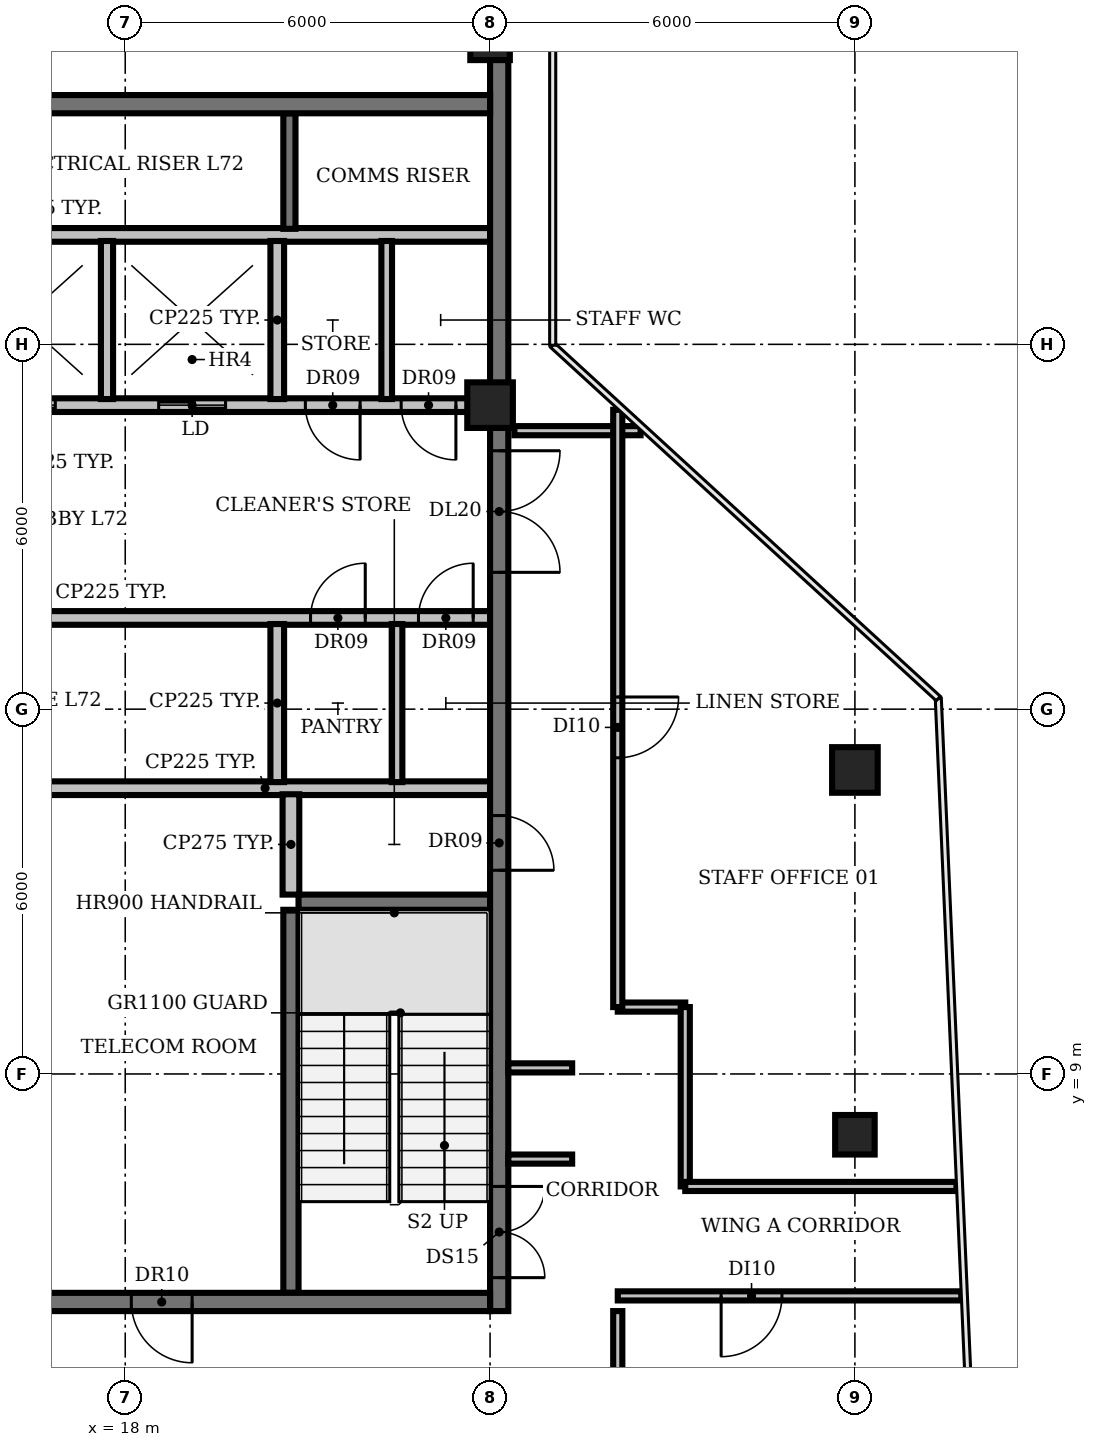
"""IFC4 building model, lengths in metres.
Left out: names, types, materials, properties, quantities, classifications, styles, units other than length and angle.
Written with IfcOpenShell. Run it as: python <this file> out.ifc"""

import sys

from ifc_helpers import new_model, si_unit, direction, frame, frame_2d, origin, origin_2d, place, context, subcontext, project, spatial, rectangle, circle, extrude, element, fill, save


model = new_model("IFC4")
c1 = context("Model", 3, precision=1e-05, world=origin(), true_north=direction((0.0, 1.0)))
c2 = subcontext(c1, "Body", "Model", "MODEL_VIEW")
j1 = project(units=[si_unit("LENGTHUNIT", "METRE"), si_unit("PLANEANGLEUNIT", "RADIAN")], contexts=[c1])
p1 = place(None, origin())
s1 = spatial("IfcSite", under=j1, at=p1, CompositionType="ELEMENT")
p2 = place(p1, origin())
s2 = spatial("IfcBuilding", under=s1, at=p2, CompositionType="ELEMENT")
p3 = place(p2, frame((0.0, 0.0, 323.0)))
s3 = spatial("IfcBuildingStorey", under=s2, at=p3, CompositionType="ELEMENT", Elevation=323.0)
p4 = place(p3, frame((24.0, 20.0, 0.0), z_axis=(0.0, 0.0, 1.0), x_axis=(1.0, 0.0, 0.0)))
e1 = element("IfcColumn", 1, at=p4, inside=s3, PredefinedType="COLUMN", context=c2, shape_type="SweptSolid", body=[
    extrude(circle(Radius=0.375, at=origin_2d()), origin(), (0.0, 0.0, 1.0), 3.9),
])
for number, where, z_axis, x_axis in (
    (2, (24.0, 26.0, 0.0), (0.0, 0.0, 1.0), (1.0, 0.0, 0.0)),
    (3, (30.0, 8.0, 0.0), (0.0, 0.0, 1.0), (1.0, 0.0, 0.0)),
):
    element("IfcColumn", number, at=place(p3, frame(where, z_axis=z_axis, x_axis=x_axis)), inside=s3, PredefinedType="COLUMN", context=c2, shape_type="SweptSolid", body=[
        extrude(rectangle(XDim=0.65, YDim=0.65, at=origin_2d()), origin(), (0.0, 0.0, 1.0), 3.9),
    ])
p5 = place(p3, frame((30.0, 14.0, 0.0), z_axis=(0.0, 0.0, 1.0), x_axis=(1.0, 0.0, 0.0)))
e4 = element("IfcColumn", 4, at=p5, inside=s3, PredefinedType="COLUMN", context=c2, shape_type="SweptSolid", body=[
    extrude(circle(Radius=0.375, at=origin_2d()), origin(), (0.0, 0.0, 1.0), 3.9),
])
p6 = place(p3, frame((20.85, 11.825, 0.0), z_axis=(0.0, 0.0, 1.0), x_axis=(1.0, 0.0, 0.0)))
e5 = element("IfcWall", 5, at=p6, inside=s3, PredefinedType="SHEAR", context=c2, shape_type="SweptSolid", body=[
    extrude(rectangle(XDim=3.15, YDim=0.25, at=frame_2d((1.575, 0.0))), origin(), (0.0, 0.0, 1.0), 3.9),
])
p7 = place(p3, frame((16.6, 13.7, 0.0), z_axis=(0.0, 0.0, 1.0), x_axis=(1.0, 0.0, 0.0)))
e6 = element("IfcWall", 6, at=p7, inside=s3, PredefinedType="PARTITIONING", context=c2, shape_type="SweptSolid", body=[
    extrude(rectangle(XDim=7.4, YDim=0.225, at=frame_2d((3.7, 0.0))), origin(), (0.0, 0.0, 1.0), 3.9),
])
p8 = place(p3, frame((9.4, 16.5, 0.0), z_axis=(0.0, 0.0, 1.0), x_axis=(1.0, 0.0, 0.0)))
e7 = element("IfcWall", 7, at=p8, inside=s3, PredefinedType="PARTITIONING", context=c2, shape_type="SweptSolid", body=[
    extrude(rectangle(XDim=14.6, YDim=0.225, at=frame_2d((7.3, 0.0))), origin(), (0.0, 0.0, 1.0), 3.9),
])
p9 = place(p8, frame((0.55, 0.0, 0.0)))
e8 = element("IfcOpeningElement", 8, at=p9, cuts=e7, PredefinedType="OPENING", context=c2, shape_type="SweptSolid", body=[
    extrude(rectangle(XDim=0.9, YDim=2.1, at=frame_2d((0.45, 1.05))), frame((0.0, 0.123, 0.0), z_axis=(0.0, -1.0, 0.0), x_axis=(1.0, 0.0, 0.0)), (0.0, 0.0, 1.0), 0.245),
])
p10 = place(p8, frame((6.075, 0.0, 0.0)))
e9 = element("IfcOpeningElement", 9, at=p10, cuts=e7, PredefinedType="OPENING", context=c2, shape_type="SweptSolid", body=[
    extrude(rectangle(XDim=1.0, YDim=2.1, at=frame_2d((0.5, 1.05))), frame((0.0, 0.123, 0.0), z_axis=(0.0, -1.0, 0.0), x_axis=(1.0, 0.0, 0.0)), (0.0, 0.0, 1.0), 0.245),
])
p11 = place(p8, frame((11.647, 0.0, 0.0)))
e10 = element("IfcOpeningElement", 10, at=p11, cuts=e7, PredefinedType="OPENING", context=c2, shape_type="SweptSolid", body=[
    extrude(rectangle(XDim=0.9, YDim=2.1, at=frame_2d((0.45, 1.05))), frame((0.0, 0.123, 0.0), z_axis=(0.0, -1.0, 0.0), x_axis=(1.0, 0.0, 0.0)), (0.0, 0.0, 1.0), 0.245),
])
p12 = place(p8, frame((13.423, 0.0, 0.0)))
e11 = element("IfcOpeningElement", 11, at=p12, cuts=e7, PredefinedType="OPENING", context=c2, shape_type="SweptSolid", body=[
    extrude(rectangle(XDim=0.9, YDim=2.1, at=frame_2d((0.45, 1.05))), frame((0.0, 0.123, 0.0), z_axis=(0.0, -1.0, 0.0), x_axis=(1.0, 0.0, 0.0)), (0.0, 0.0, 1.0), 0.245),
])
p13 = place(p3, frame((24.0, 20.0, 0.0), z_axis=(0.0, 0.0, 1.0), x_axis=(-1.0, 0.0, 0.0)))
e12 = element("IfcWall", 12, at=p13, inside=s3, PredefinedType="PARTITIONING", context=c2, shape_type="SweptSolid", body=[
    extrude(rectangle(XDim=14.6, YDim=0.225, at=frame_2d((7.3, 0.0))), origin(), (0.0, 0.0, 1.0), 3.9),
])
p14 = place(p13, frame((12.75, 0.0, 0.0)))
e13 = element("IfcOpeningElement", 13, at=p14, cuts=e12, PredefinedType="OPENING", context=c2, shape_type="SweptSolid", body=[
    extrude(rectangle(XDim=1.1, YDim=2.1, at=frame_2d((0.55, 1.05))), frame((0.0, 0.123, 0.0), z_axis=(0.0, -1.0, 0.0), x_axis=(1.0, 0.0, 0.0)), (0.0, 0.0, 1.0), 0.245),
])
p15 = place(p13, frame((9.95, 0.0, 0.0)))
e14 = element("IfcOpeningElement", 14, at=p15, cuts=e12, PredefinedType="OPENING", context=c2, shape_type="SweptSolid", body=[
    extrude(rectangle(XDim=1.1, YDim=2.1, at=frame_2d((0.55, 1.05))), frame((0.0, 0.123, 0.0), z_axis=(0.0, -1.0, 0.0), x_axis=(1.0, 0.0, 0.0)), (0.0, 0.0, 1.0), 0.245),
])
p16 = place(p13, frame((7.15, 0.0, 0.0)))
e15 = element("IfcOpeningElement", 15, at=p16, cuts=e12, PredefinedType="OPENING", context=c2, shape_type="SweptSolid", body=[
    extrude(rectangle(XDim=1.1, YDim=2.1, at=frame_2d((0.55, 1.05))), frame((0.0, 0.123, 0.0), z_axis=(0.0, -1.0, 0.0), x_axis=(1.0, 0.0, 0.0)), (0.0, 0.0, 1.0), 0.245),
])
p17 = place(p13, frame((4.35, 0.0, 0.0)))
e16 = element("IfcOpeningElement", 16, at=p17, cuts=e12, PredefinedType="OPENING", context=c2, shape_type="SweptSolid", body=[
    extrude(rectangle(XDim=1.1, YDim=2.1, at=frame_2d((0.55, 1.05))), frame((0.0, 0.123, 0.0), z_axis=(0.0, -1.0, 0.0), x_axis=(1.0, 0.0, 0.0)), (0.0, 0.0, 1.0), 0.245),
])
p18 = place(p13, frame((2.137, 0.0, 0.0)))
e17 = element("IfcOpeningElement", 17, at=p18, cuts=e12, PredefinedType="OPENING", context=c2, shape_type="SweptSolid", body=[
    extrude(rectangle(XDim=0.9, YDim=2.1, at=frame_2d((0.45, 1.05))), frame((0.0, 0.123, 0.0), z_axis=(0.0, -1.0, 0.0), x_axis=(1.0, 0.0, 0.0)), (0.0, 0.0, 1.0), 0.245),
])
p19 = place(p13, frame((0.562, 0.0, 0.0)))
e18 = element("IfcOpeningElement", 18, at=p19, cuts=e12, PredefinedType="OPENING", context=c2, shape_type="SweptSolid", body=[
    extrude(rectangle(XDim=0.9, YDim=2.1, at=frame_2d((0.45, 1.05))), frame((0.0, 0.123, 0.0), z_axis=(0.0, -1.0, 0.0), x_axis=(1.0, 0.0, 0.0)), (0.0, 0.0, 1.0), 0.245),
])
p20 = place(p3, frame((9.4, 22.8, 0.0), z_axis=(0.0, 0.0, 1.0), x_axis=(1.0, 0.0, 0.0)))
e19 = element("IfcWall", 19, at=p20, inside=s3, PredefinedType="PARTITIONING", context=c2, shape_type="SweptSolid", body=[
    extrude(rectangle(XDim=14.6, YDim=0.225, at=frame_2d((7.3, 0.0))), origin(), (0.0, 0.0, 1.0), 3.9),
])
p21 = place(p3, frame((17.7, 20.1, 0.0), z_axis=(0.0, 0.0, 1.0), x_axis=(0.0, 1.0, 0.0)))
e20 = element("IfcWall", 20, at=p21, inside=s3, PredefinedType="SOLIDWALL", context=c2, shape_type="SweptSolid", body=[
    extrude(rectangle(XDim=2.6, YDim=0.2, at=frame_2d((1.3, 0.0))), origin(), (0.0, 0.0, 1.0), 3.9),
])
for number, where, z_axis, x_axis in (
    (21, (20.5, 13.8, 0.0), (0.0, 0.0, 1.0), (0.0, 1.0, 0.0)),
    (22, (20.5, 20.1, 0.0), (0.0, 0.0, 1.0), (0.0, 1.0, 0.0)),
):
    element("IfcWall", number, at=place(p3, frame(where, z_axis=z_axis, x_axis=x_axis)), inside=s3, PredefinedType="PARTITIONING", context=c2, shape_type="SweptSolid", body=[
        extrude(rectangle(XDim=2.6, YDim=0.225, at=frame_2d((1.3, 0.0))), origin(), (0.0, 0.0, 1.0), 3.9),
    ])
p22 = place(p3, frame((20.7, 22.9, 0.0), z_axis=(0.0, 0.0, 1.0), x_axis=(0.0, 1.0, 0.0)))
e23 = element("IfcWall", 23, at=p22, inside=s3, PredefinedType="SHEAR", context=c2, shape_type="SweptSolid", body=[
    extrude(rectangle(XDim=1.9, YDim=0.2, at=frame_2d((0.95, 0.0))), origin(), (0.0, 0.0, 1.0), 3.9),
])
p23 = place(p3, frame((20.725, 5.4, 0.0), z_axis=(0.0, 0.0, 1.0), x_axis=(0.0, 1.0, 0.0)))
e24 = element("IfcWall", 24, at=p23, inside=s3, PredefinedType="SHEAR", context=c2, shape_type="SweptSolid", body=[
    extrude(rectangle(XDim=6.3, YDim=0.25, at=frame_2d((3.15, 0.0))), origin(), (0.0, 0.0, 1.0), 3.9),
])
p24 = place(p3, frame((20.725, 11.95, 0.0), z_axis=(0.0, 0.0, 1.0), x_axis=(0.0, 1.0, 0.0)))
e25 = element("IfcWall", 25, at=p24, inside=s3, PredefinedType="PARTITIONING", context=c2, shape_type="SweptSolid", body=[
    extrude(rectangle(XDim=1.65, YDim=0.275, at=frame_2d((0.825, 0.0))), origin(), (0.0, 0.0, 1.0), 3.9),
])
for number, where, z_axis, x_axis in (
    (26, (22.3, 20.1, 0.0), (0.0, 0.0, 1.0), (0.0, 1.0, 0.0)),
    (27, (22.47, 13.8, 0.0), (0.0, 0.0, 1.0), (0.0, 1.0, 0.0)),
):
    element("IfcWall", number, at=place(p3, frame(where, z_axis=z_axis, x_axis=x_axis)), inside=s3, PredefinedType="PARTITIONING", context=c2, shape_type="SweptSolid", body=[
        extrude(rectangle(XDim=2.6, YDim=0.175, at=frame_2d((1.3, 0.0))), origin(), (0.0, 0.0, 1.0), 3.9),
    ])
p25 = place(p3, frame((24.15, 25.705, 0.0), z_axis=(0.0, 0.0, 1.0), x_axis=(0.0, -1.0, 0.0)))
e28 = element("IfcWall", 28, at=p25, inside=s3, PredefinedType="SHEAR", context=c2, shape_type="SweptSolid", body=[
    extrude(rectangle(XDim=20.605, YDim=0.3, at=frame_2d((10.302, 0.0))), origin(), (0.0, 0.0, 1.0), 3.9),
])
p26 = place(p25, frame((18.555, 0.0, 0.0)))
e29 = element("IfcOpeningElement", 29, at=p26, cuts=e28, PredefinedType="OPENING", context=c2, shape_type="SweptSolid", body=[
    extrude(rectangle(XDim=1.5, YDim=2.1, at=frame_2d((0.75, 1.05))), frame((0.0, 0.16, 0.0), z_axis=(0.0, -1.0, 0.0), x_axis=(1.0, 0.0, 0.0)), (0.0, 0.0, 1.0), 0.32),
])
p27 = place(p25, frame((12.455, 0.0, 0.0)))
e30 = element("IfcOpeningElement", 30, at=p27, cuts=e28, PredefinedType="OPENING", context=c2, shape_type="SweptSolid", body=[
    extrude(rectangle(XDim=0.9, YDim=2.1, at=frame_2d((0.45, 1.05))), frame((0.0, 0.16, 0.0), z_axis=(0.0, -1.0, 0.0), x_axis=(1.0, 0.0, 0.0)), (0.0, 0.0, 1.0), 0.32),
])
p28 = place(p25, frame((6.455, 0.0, 0.0)))
e31 = element("IfcOpeningElement", 31, at=p28, cuts=e28, PredefinedType="OPENING", context=c2, shape_type="SweptSolid", body=[
    extrude(rectangle(XDim=2.0, YDim=2.1, at=frame_2d((1.0, 1.05))), frame((0.0, 0.16, 0.0), z_axis=(0.0, -1.0, 0.0), x_axis=(1.0, 0.0, 0.0)), (0.0, 0.0, 1.0), 0.32),
])
p29 = place(p3, frame((24.0, 5.25, 0.0), z_axis=(0.0, 0.0, 1.0), x_axis=(-1.0, 0.0, 0.0)))
e32 = element("IfcWall", 32, at=p29, inside=s3, PredefinedType="SHEAR", context=c2, shape_type="SweptSolid", body=[
    extrude(rectangle(XDim=18.0, YDim=0.3, at=frame_2d((9.0, 0.0))), origin(), (0.0, 0.0, 1.0), 3.9),
])
p30 = place(p29, frame((13.0, 0.0, 0.0)))
e33 = element("IfcOpeningElement", 33, at=p30, cuts=e32, PredefinedType="OPENING", context=c2, shape_type="SweptSolid", body=[
    extrude(rectangle(XDim=1.2, YDim=2.1, at=frame_2d((0.6, 1.05))), frame((0.0, 0.16, 0.0), z_axis=(0.0, -1.0, 0.0), x_axis=(1.0, 0.0, 0.0)), (0.0, 0.0, 1.0), 0.32),
])
p31 = place(p29, frame((4.9, 0.0, 0.0)))
e34 = element("IfcOpeningElement", 34, at=p31, cuts=e32, PredefinedType="OPENING", context=c2, shape_type="SweptSolid", body=[
    extrude(rectangle(XDim=1.0, YDim=2.1, at=frame_2d((0.5, 1.05))), frame((0.0, 0.16, 0.0), z_axis=(0.0, -1.0, 0.0), x_axis=(1.0, 0.0, 0.0)), (0.0, 0.0, 1.0), 0.32),
])
p32 = place(p3, frame((6.0, 24.95, 0.0), z_axis=(0.0, 0.0, 1.0), x_axis=(1.0, 0.0, 0.0)))
e35 = element("IfcWall", 35, at=p32, inside=s3, PredefinedType="SHEAR", context=c2, shape_type="SweptSolid", body=[
    extrude(rectangle(XDim=18.0, YDim=0.3, at=frame_2d((9.0, 0.0))), origin(), (0.0, 0.0, 1.0), 3.9),
])
for number, where, z_axis, x_axis in (
    (36, (24.3, 7.6, 0.0), (0.0, 0.0, 1.0), (1.0, 0.0, 0.0)),
    (37, (24.3, 9.1, 0.0), (0.0, 0.0, 1.0), (1.0, 0.0, 0.0)),
):
    element("IfcWall", number, at=place(p3, frame(where, z_axis=z_axis, x_axis=x_axis)), inside=s3, PredefinedType="PARTITIONING", context=c2, shape_type="SweptSolid", body=[
        extrude(rectangle(XDim=1.05, YDim=0.15, at=frame_2d((0.525, 0.0))), origin(), (0.0, 0.0, 1.0), 2.48),
    ])
p33 = place(p3, frame((24.4, 19.58, 0.0), z_axis=(0.0, 0.0, 1.0), x_axis=(1.0, 0.0, 0.0)))
e38 = element("IfcWall", 38, at=p33, inside=s3, PredefinedType="PARTITIONING", context=c2, shape_type="SweptSolid", body=[
    extrude(rectangle(XDim=2.075, YDim=0.15, at=frame_2d((1.038, 0.0))), origin(), (0.0, 0.0, 1.0), 2.48),
])
p34 = place(p3, frame((26.1, 2.1, 0.0), z_axis=(0.0, 0.0, 1.0), x_axis=(0.0, 1.0, 0.0)))
e39 = element("IfcWall", 39, at=p34, inside=s3, PredefinedType="PARTITIONING", context=c2, shape_type="SweptSolid", body=[
    extrude(rectangle(XDim=3.0, YDim=0.15, at=frame_2d((1.5, 0.0))), origin(), (0.0, 0.0, 1.0), 2.48),
])
p35 = place(p3, frame((26.1, 10.1, 0.0), z_axis=(0.0, 0.0, 1.0), x_axis=(1.0, 0.0, 0.0)))
e40 = element("IfcWall", 40, at=p35, inside=s3, PredefinedType="PARTITIONING", context=c2, shape_type="SweptSolid", body=[
    extrude(rectangle(XDim=1.11, YDim=0.15, at=frame_2d((0.555, 0.0))), origin(), (0.0, 0.0, 1.0), 2.48),
])
p36 = place(p3, frame((26.1, 19.924, 0.0), z_axis=(0.0, 0.0, 1.0), x_axis=(0.0, -1.0, 0.0)))
e41 = element("IfcWall", 41, at=p36, inside=s3, PredefinedType="PARTITIONING", context=c2, shape_type="SweptSolid", body=[
    extrude(rectangle(XDim=9.823, YDim=0.15, at=frame_2d((4.912, 0.0))), origin(), (0.0, 0.0, 1.0), 2.48),
])
p37 = place(p36, frame((4.724, 0.0, 0.0)))
e42 = element("IfcOpeningElement", 42, at=p37, cuts=e41, PredefinedType="OPENING", context=c2, shape_type="SweptSolid", body=[
    extrude(rectangle(XDim=1.0, YDim=2.1, at=frame_2d((0.5, 1.05))), frame((0.0, 0.085, 0.0), z_axis=(0.0, -1.0, 0.0), x_axis=(1.0, 0.0, 0.0)), (0.0, 0.0, 1.0), 0.17),
])
p38 = place(p3, frame((27.21, 7.15, 0.0), z_axis=(0.0, 0.0, 1.0), x_axis=(0.0, 1.0, 0.0)))
e43 = element("IfcWall", 43, at=p38, inside=s3, PredefinedType="PARTITIONING", context=c2, shape_type="SweptSolid", body=[
    extrude(rectangle(XDim=2.95, YDim=0.15, at=frame_2d((1.475, 0.0))), origin(), (0.0, 0.0, 1.0), 2.48),
])
p39 = place(p3, frame((27.21, 7.15, 0.0), z_axis=(0.0, 0.0, 1.0), x_axis=(1.0, 0.0, 0.0)))
e44 = element("IfcWall", 44, at=p39, inside=s3, PredefinedType="PARTITIONING", context=c2, shape_type="SweptSolid", body=[
    extrude(rectangle(XDim=4.46, YDim=0.15, at=frame_2d((2.23, 0.0))), origin(), (0.0, 0.0, 1.0), 2.48),
])
p40 = place(p3, frame((31.75, 5.35, 0.0), z_axis=(0.0, 0.0, 1.0), x_axis=(-1.0, 0.0, 0.0)))
e45 = element("IfcWall", 45, at=p40, inside=s3, PredefinedType="PARTITIONING", context=c2, shape_type="SweptSolid", body=[
    extrude(rectangle(XDim=5.65, YDim=0.15, at=frame_2d((2.825, 0.0))), origin(), (0.0, 0.0, 1.0), 2.48),
])
p41 = place(p40, frame((2.95, 0.0, 0.0)))
e46 = element("IfcOpeningElement", 46, at=p41, cuts=e45, PredefinedType="OPENING", context=c2, shape_type="SweptSolid", body=[
    extrude(rectangle(XDim=1.0, YDim=2.1, at=frame_2d((0.5, 1.05))), frame((0.0, 0.085, 0.0), z_axis=(0.0, -1.0, 0.0), x_axis=(1.0, 0.0, 0.0)), (0.0, 0.0, 1.0), 0.17),
])
p42 = place(p11, origin())
e47 = element("IfcDoor", 47, at=p42, inside=s3, OperationType="SINGLE_SWING_RIGHT", PredefinedType="DOOR", context=c2, shape_type="SweptSolid", body=[
    extrude(rectangle(XDim=0.9, YDim=2.1, at=frame_2d((0.45, 1.05))), frame((0.0, 0.025, 0.0), z_axis=(0.0, -1.0, 0.0), x_axis=(1.0, 0.0, 0.0)), (0.0, 0.0, 1.0), 0.05),
])
fill(e10, e47)
p43 = place(p12, origin())
e48 = element("IfcDoor", 48, at=p43, inside=s3, OperationType="SINGLE_SWING_RIGHT", PredefinedType="DOOR", context=c2, shape_type="SweptSolid", body=[
    extrude(rectangle(XDim=0.9, YDim=2.1, at=frame_2d((0.45, 1.05))), frame((0.0, 0.025, 0.0), z_axis=(0.0, -1.0, 0.0), x_axis=(1.0, 0.0, 0.0)), (0.0, 0.0, 1.0), 0.05),
])
fill(e11, e48)
p44 = place(p16, origin())
e49 = element("IfcDoor", 49, at=p44, inside=s3, OperationType="DOUBLE_DOOR_SLIDING", PredefinedType="DOOR", context=c2, shape_type="SweptSolid", body=[
    extrude(rectangle(XDim=1.1, YDim=2.1, at=frame_2d((0.55, 1.05))), frame((0.0, 0.025, 0.0), z_axis=(0.0, -1.0, 0.0), x_axis=(1.0, 0.0, 0.0)), (0.0, 0.0, 1.0), 0.05),
])
fill(e15, e49)
p45 = place(p17, origin())
e50 = element("IfcDoor", 50, at=p45, inside=s3, OperationType="DOUBLE_DOOR_SLIDING", PredefinedType="DOOR", context=c2, shape_type="SweptSolid", body=[
    extrude(rectangle(XDim=1.1, YDim=2.1, at=frame_2d((0.55, 1.05))), frame((0.0, 0.025, 0.0), z_axis=(0.0, -1.0, 0.0), x_axis=(1.0, 0.0, 0.0)), (0.0, 0.0, 1.0), 0.05),
])
fill(e16, e50)
p46 = place(p18, origin())
e51 = element("IfcDoor", 51, at=p46, inside=s3, OperationType="SINGLE_SWING_LEFT", PredefinedType="DOOR", context=c2, shape_type="SweptSolid", body=[
    extrude(rectangle(XDim=0.9, YDim=2.1, at=frame_2d((0.45, 1.05))), frame((0.0, 0.025, 0.0), z_axis=(0.0, -1.0, 0.0), x_axis=(1.0, 0.0, 0.0)), (0.0, 0.0, 1.0), 0.05),
])
fill(e17, e51)
p47 = place(p19, origin())
e52 = element("IfcDoor", 52, at=p47, inside=s3, OperationType="SINGLE_SWING_LEFT", PredefinedType="DOOR", context=c2, shape_type="SweptSolid", body=[
    extrude(rectangle(XDim=0.9, YDim=2.1, at=frame_2d((0.45, 1.05))), frame((0.0, 0.025, 0.0), z_axis=(0.0, -1.0, 0.0), x_axis=(1.0, 0.0, 0.0)), (0.0, 0.0, 1.0), 0.05),
])
fill(e18, e52)
p48 = place(p26, origin())
e53 = element("IfcDoor", 53, at=p48, inside=s3, OperationType="DOUBLE_DOOR_SINGLE_SWING", PredefinedType="DOOR", context=c2, shape_type="SweptSolid", body=[
    extrude(rectangle(XDim=1.5, YDim=2.1, at=frame_2d((0.75, 1.05))), frame((0.0, 0.025, 0.0), z_axis=(0.0, -1.0, 0.0), x_axis=(1.0, 0.0, 0.0)), (0.0, 0.0, 1.0), 0.05),
])
fill(e29, e53)
p49 = place(p27, origin())
e54 = element("IfcDoor", 54, at=p49, inside=s3, OperationType="SINGLE_SWING_RIGHT", PredefinedType="DOOR", context=c2, shape_type="SweptSolid", body=[
    extrude(rectangle(XDim=0.9, YDim=2.1, at=frame_2d((0.45, 1.05))), frame((0.0, 0.025, 0.0), z_axis=(0.0, -1.0, 0.0), x_axis=(1.0, 0.0, 0.0)), (0.0, 0.0, 1.0), 0.05),
])
fill(e30, e54)
p50 = place(p28, origin())
e55 = element("IfcDoor", 55, at=p50, inside=s3, OperationType="DOUBLE_DOOR_SINGLE_SWING", PredefinedType="DOOR", context=c2, shape_type="SweptSolid", body=[
    extrude(rectangle(XDim=2.0, YDim=2.1, at=frame_2d((1.0, 1.05))), frame((0.0, 0.025, 0.0), z_axis=(0.0, -1.0, 0.0), x_axis=(1.0, 0.0, 0.0)), (0.0, 0.0, 1.0), 0.05),
])
fill(e31, e55)
p51 = place(p31, origin())
e56 = element("IfcDoor", 56, at=p51, inside=s3, OperationType="SINGLE_SWING_LEFT", PredefinedType="DOOR", context=c2, shape_type="SweptSolid", body=[
    extrude(rectangle(XDim=1.0, YDim=2.1, at=frame_2d((0.5, 1.05))), frame((0.0, 0.025, 0.0), z_axis=(0.0, -1.0, 0.0), x_axis=(1.0, 0.0, 0.0)), (0.0, 0.0, 1.0), 0.05),
])
fill(e34, e56)
p52 = place(p37, origin())
e57 = element("IfcDoor", 57, at=p52, inside=s3, OperationType="SINGLE_SWING_LEFT", PredefinedType="DOOR", context=c2, shape_type="SweptSolid", body=[
    extrude(rectangle(XDim=1.0, YDim=2.1, at=frame_2d((0.5, 1.05))), frame((0.0, 0.025, 0.0), z_axis=(0.0, -1.0, 0.0), x_axis=(1.0, 0.0, 0.0)), (0.0, 0.0, 1.0), 0.05),
])
fill(e42, e57)
p53 = place(p41, origin())
e58 = element("IfcDoor", 58, at=p53, inside=s3, OperationType="SINGLE_SWING_RIGHT", PredefinedType="DOOR", context=c2, shape_type="SweptSolid", body=[
    extrude(rectangle(XDim=1.0, YDim=2.1, at=frame_2d((0.5, 1.05))), frame((0.0, 0.025, 0.0), z_axis=(0.0, -1.0, 0.0), x_axis=(1.0, 0.0, 0.0)), (0.0, 0.0, 1.0), 0.05),
])
fill(e46, e58)
save(model, sys.argv[1])
